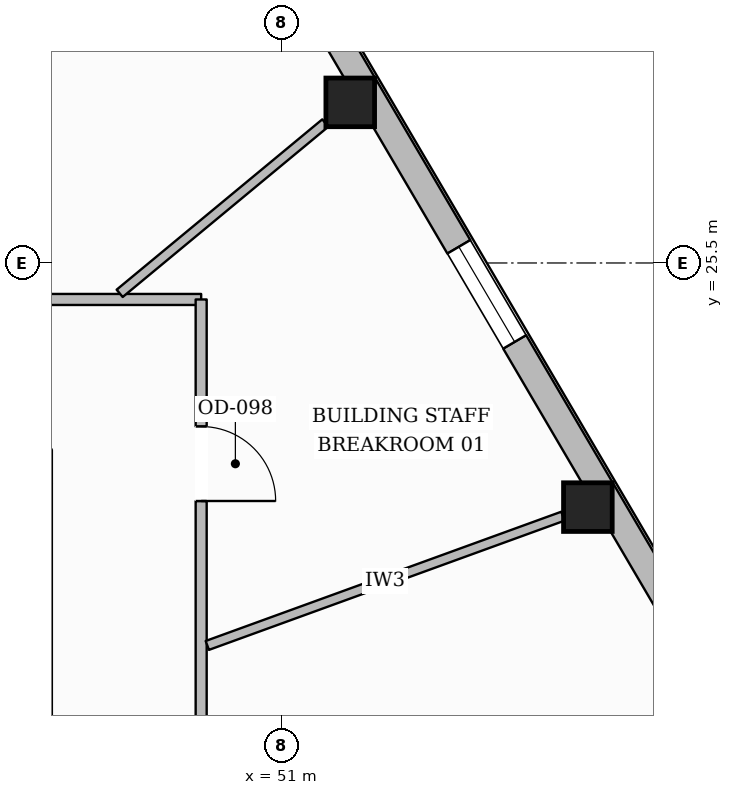
"""IFC4 building model, lengths in metres.
Left out: names, types, materials, properties, quantities, classifications, styles, units other than length and angle.
Written with IfcOpenShell. Run it as: python <this file> out.ifc"""

import sys

from ifc_helpers import new_model, si_unit, direction, frame, frame_2d, origin, origin_2d, place, context, subcontext, project, spatial, rectangle, hollow_rectangle, extrude, element, fill, save


model = new_model("IFC4")
c1 = context("Model", 3, precision=1e-05, world=origin(), true_north=direction((0.0, 1.0)))
c2 = subcontext(c1, "Body", "Model", "MODEL_VIEW")
j1 = project(units=[si_unit("LENGTHUNIT", "METRE"), si_unit("PLANEANGLEUNIT", "RADIAN")], contexts=[c1])
p1 = place(None, origin())
s1 = spatial("IfcSite", under=j1, at=p1, CompositionType="ELEMENT")
p2 = place(p1, origin())
s2 = spatial("IfcBuilding", under=s1, at=p2, CompositionType="ELEMENT")
p3 = place(p2, frame((0.0, 0.0, 191.95)))
s3 = spatial("IfcBuildingStorey", under=s2, at=p3, CompositionType="ELEMENT", Elevation=191.95)
for number, where, z_axis, x_axis in (
    (1, (55.028, 22.288, 0.0), (0.0, 0.0, 1.0), (1.0, 0.0, 0.0)),
    (2, (51.901, 27.613, 0.0), (0.0, 0.0, 1.0), (1.0, 0.0, 0.0)),
):
    element("IfcColumn", number, at=place(p3, frame(where, z_axis=z_axis, x_axis=x_axis)), inside=s3, PredefinedType="COLUMN", context=c2, shape_type="SweptSolid", body=[
        extrude(hollow_rectangle(XDim=0.64, YDim=0.64, WallThickness=0.028, at=origin_2d()), origin(), (0.0, 0.0, 1.0), 3.6),
    ])
p4 = place(p3, frame((42.516, 44.131, 0.0), z_axis=(0.0, 0.0, 1.0), x_axis=(0.506310158323, -0.862351450152, 0.0)))
e3 = element("IfcWall", 3, at=p4, inside=s3, PredefinedType="STANDARD", context=c2, shape_type="SweptSolid", body=[
    extrude(rectangle(XDim=38.0, YDim=0.35, at=frame_2d((19.0, 0.0))), origin(), (0.0, 0.0, 1.0), 3.132),
])
p5 = place(p4, frame((33.708, 0.0, 0.65)))
e4 = element("IfcOpeningElement", 4, at=p5, cuts=e3, PredefinedType="OPENING", context=c2, shape_type="SweptSolid", body=[
    extrude(rectangle(XDim=1.45, YDim=1.75, at=frame_2d((0.725, 0.875))), frame((0.0, 0.185, 0.0), z_axis=(0.0, -1.0, 0.0), x_axis=(1.0, 0.0, 0.0)), (0.0, 0.0, 1.0), 0.37),
])
p6 = place(p4, frame((27.534, 0.0, 0.65)))
e5 = element("IfcOpeningElement", 5, at=p6, cuts=e3, PredefinedType="OPENING", context=c2, shape_type="SweptSolid", body=[
    extrude(rectangle(XDim=1.45, YDim=1.75, at=frame_2d((0.725, 0.875))), frame((0.0, 0.185, 0.0), z_axis=(0.0, -1.0, 0.0), x_axis=(1.0, 0.0, 0.0)), (0.0, 0.0, 1.0), 0.37),
])
p7 = place(p4, frame((21.359, 0.0, 0.65)))
e6 = element("IfcOpeningElement", 6, at=p7, cuts=e3, PredefinedType="OPENING", context=c2, shape_type="SweptSolid", body=[
    extrude(rectangle(XDim=1.45, YDim=1.75, at=frame_2d((0.725, 0.875))), frame((0.0, 0.185, 0.0), z_axis=(0.0, -1.0, 0.0), x_axis=(1.0, 0.0, 0.0)), (0.0, 0.0, 1.0), 0.37),
])
p8 = place(p4, frame((9.009, 0.0, 0.65)))
e7 = element("IfcOpeningElement", 7, at=p8, cuts=e3, PredefinedType="OPENING", context=c2, shape_type="SweptSolid", body=[
    extrude(rectangle(XDim=1.45, YDim=1.75, at=frame_2d((0.725, 0.875))), frame((0.0, 0.185, 0.0), z_axis=(0.0, -1.0, 0.0), x_axis=(1.0, 0.0, 0.0)), (0.0, 0.0, 1.0), 0.37),
])
p9 = place(p4, frame((2.834, 0.0, 0.65)))
e8 = element("IfcOpeningElement", 8, at=p9, cuts=e3, PredefinedType="OPENING", context=c2, shape_type="SweptSolid", body=[
    extrude(rectangle(XDim=1.45, YDim=1.75, at=frame_2d((0.725, 0.875))), frame((0.0, 0.185, 0.0), z_axis=(0.0, -1.0, 0.0), x_axis=(1.0, 0.0, 0.0)), (0.0, 0.0, 1.0), 0.37),
])
p10 = place(p3, frame((47.0, 25.02, 0.0), z_axis=(0.0, 0.0, 1.0), x_axis=(1.0, 0.0, 0.0)))
e9 = element("IfcWall", 9, at=p10, inside=s3, PredefinedType="PARTITIONING", context=c2, shape_type="SweptSolid", body=[
    extrude(rectangle(XDim=2.94, YDim=0.145, at=frame_2d((1.47, 0.0))), origin(), (0.0, 0.0, 1.0), 3.6),
])
p11 = place(p3, frame((49.94, 25.02, 0.0), z_axis=(0.0, 0.0, 1.0), x_axis=(0.0, -1.0, 0.0)))
e10 = element("IfcWall", 10, at=p11, inside=s3, PredefinedType="PARTITIONING", context=c2, shape_type="SweptSolid", body=[
    extrude(rectangle(XDim=7.92, YDim=0.145, at=frame_2d((3.96, 0.0))), origin(), (0.0, 0.0, 1.0), 3.339),
])
p12 = place(p11, frame((1.671, 0.0, 0.0)))
e11 = element("IfcOpeningElement", 11, at=p12, cuts=e10, PredefinedType="OPENING", context=c2, shape_type="SweptSolid", body=[
    extrude(rectangle(XDim=0.98, YDim=2.15, at=frame_2d((0.49, 1.075))), frame((0.0, 0.083, 0.0), z_axis=(0.0, -1.0, 0.0), x_axis=(1.0, 0.0, 0.0)), (0.0, 0.0, 1.0), 0.165),
])
p13 = place(p3, frame((50.021, 20.469, 0.0), z_axis=(0.0, 0.0, 1.0), x_axis=(0.939863560333, 0.341550125103, 0.0)))
e12 = element("IfcWall", 12, at=p13, inside=s3, PredefinedType="PARTITIONING", context=c2, shape_type="SweptSolid", body=[
    extrude(rectangle(XDim=4.979, YDim=0.125, at=frame_2d((2.489, 0.0))), origin(), (0.0, 0.0, 1.0), 3.6),
])
p14 = place(p3, frame((48.868, 25.101, 0.0), z_axis=(0.0, 0.0, 1.0), x_axis=(0.77016591737, 0.637843601302, 0.0)))
e13 = element("IfcWall", 13, at=p14, inside=s3, PredefinedType="PARTITIONING", context=c2, shape_type="SweptSolid", body=[
    extrude(rectangle(XDim=3.513, YDim=0.125, at=frame_2d((1.756, 0.0))), origin(), (0.0, 0.0, 1.0), 3.141),
])
p15 = place(p7, origin())
e14 = element("IfcWindow", 14, at=p15, inside=s3, PartitioningType="SINGLE_PANEL", PredefinedType="WINDOW", context=c2, shape_type="SweptSolid", body=[
    extrude(rectangle(XDim=1.45, YDim=1.75, at=frame_2d((0.725, 0.875))), frame((0.0, 0.03, 0.0), z_axis=(0.0, -1.0, 0.0), x_axis=(1.0, 0.0, 0.0)), (0.0, 0.0, 1.0), 0.06),
])
fill(e6, e14)
p16 = place(p12, origin())
e15 = element("IfcDoor", 15, at=p16, inside=s3, OperationType="SINGLE_SWING_RIGHT", PredefinedType="DOOR", context=c2, shape_type="SweptSolid", body=[
    extrude(rectangle(XDim=0.98, YDim=2.15, at=frame_2d((0.49, 1.075))), frame((0.0, 0.025, 0.0), z_axis=(0.0, -1.0, 0.0), x_axis=(1.0, 0.0, 0.0)), (0.0, 0.0, 1.0), 0.05),
])
fill(e11, e15)
save(model, sys.argv[1])
